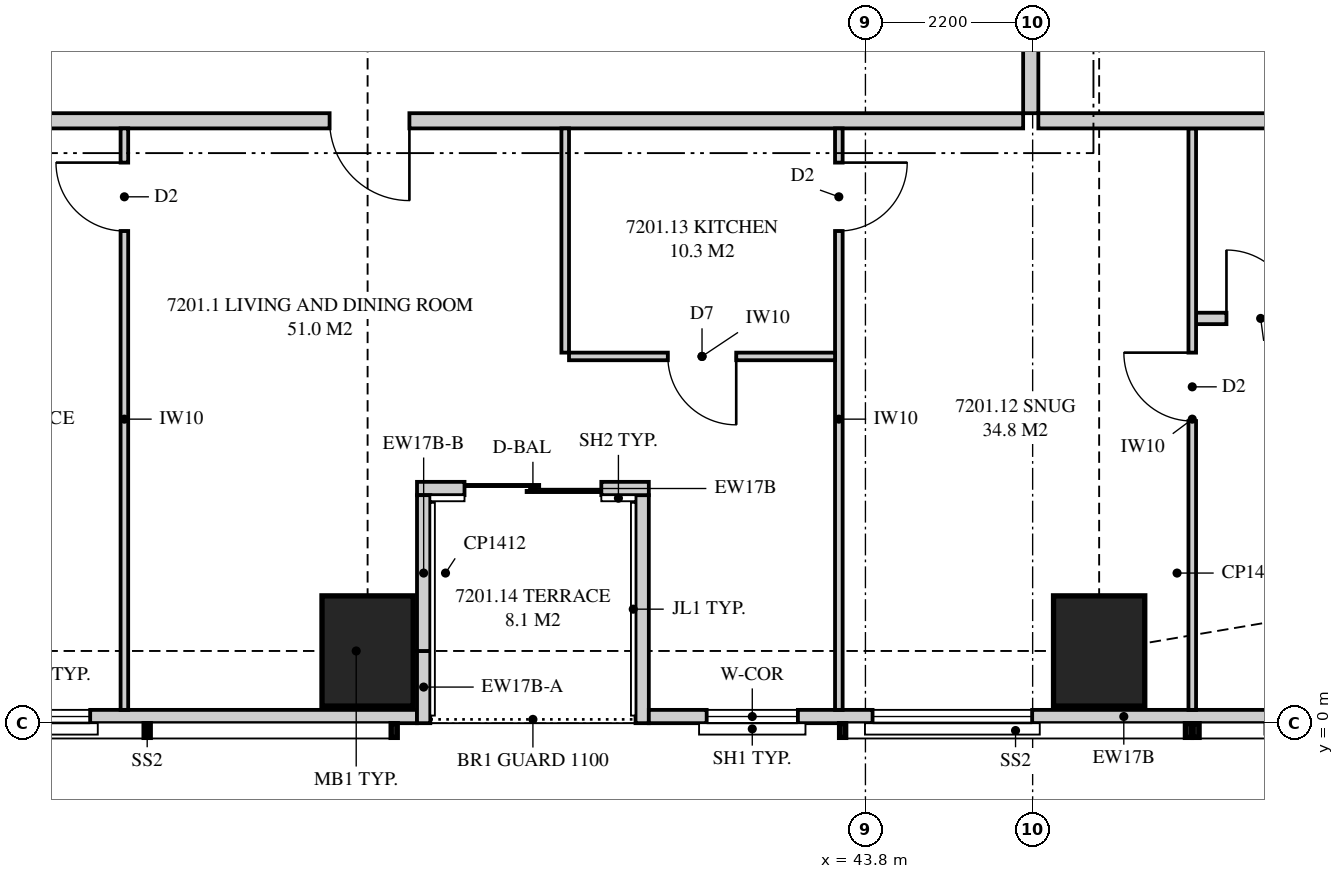
"""IFC4 building model, lengths in metres.
Left out: names, types, materials, properties, quantities, classifications, styles, units other than length and angle.
Written with IfcOpenShell. Run it as: python <this file> out.ifc"""

import sys

from ifc_helpers import new_model, si_unit, direction, frame, frame_2d, origin, origin_2d, place, context, subcontext, project, spatial, polyline, rectangle, outline, extrude, element, fill, save


model = new_model("IFC4")
c1 = context("Model", 3, precision=1e-05, world=origin(), true_north=direction((0.0, 1.0)))
c2 = subcontext(c1, "Body", "Model", "MODEL_VIEW")
j1 = project(units=[si_unit("LENGTHUNIT", "METRE"), si_unit("PLANEANGLEUNIT", "RADIAN")], contexts=[c1])
p1 = place(None, origin())
s1 = spatial("IfcSite", under=j1, at=p1, CompositionType="ELEMENT")
p2 = place(p1, origin())
s2 = spatial("IfcBuilding", under=s1, at=p2, CompositionType="ELEMENT")
p3 = place(p2, frame((0.0, 0.0, 263.85)))
s3 = spatial("IfcBuildingStorey", under=s2, at=p3, CompositionType="ELEMENT", Elevation=263.85)
for number, where, z_axis, x_axis in (
    (1, (37.25, 0.95, 0.0), (0.0, 0.0, 1.0), (0.0, 1.0, 0.0)),
    (2, (46.875, 0.95, 0.0), (0.0, 0.0, 1.0), (0.0, 1.0, 0.0)),
):
    element("IfcColumn", number, at=place(p3, frame(where, z_axis=z_axis, x_axis=x_axis)), inside=s3, PredefinedType="COLUMN", context=c2, shape_type="SweptSolid", body=[
        extrude(rectangle(XDim=1.45, YDim=1.2, at=origin_2d()), origin(), (0.0, 0.0, 1.0), 3.9),
    ])
p4 = place(p3, frame((19.851, 0.087, 0.0), z_axis=(0.0, 0.0, 1.0), x_axis=(1.0, 0.0, 0.0)))
e3 = element("IfcWall", 3, at=p4, inside=s3, PredefinedType="SOLIDWALL", context=c2, shape_type="SweptSolid", body=[
    extrude(outline(polyline([(0.0, 0.0), (18.049, 0.0), (18.049, 2.7), (7.774, 2.7), (7.774, 3.62), (7.642, 3.62), (7.642, 2.7), (7.559, 2.7), (7.559, 3.62), (0.0, 3.62), (0.0, 0.0)])), frame((0.0, 0.087, 0.0), z_axis=(0.0, -1.0, 0.0), x_axis=(1.0, 0.0, 0.0)), (0.0, 0.0, 1.0), 0.175),
])
p5 = place(p4, frame((3.399, 0.0, 0.4)))
e4 = element("IfcOpeningElement", 4, at=p5, cuts=e3, PredefinedType="OPENING", context=c2, shape_type="SweptSolid", body=[
    extrude(rectangle(XDim=2.1, YDim=2.25, at=frame_2d((1.05, 1.125))), frame((0.0, 0.097, 0.0), z_axis=(0.0, -1.0, 0.0), x_axis=(1.0, 0.0, 0.0)), (0.0, 0.0, 1.0), 0.195),
])
p6 = place(p4, frame((8.655, 0.0, 0.4)))
e5 = element("IfcOpeningElement", 5, at=p6, cuts=e3, PredefinedType="OPENING", context=c2, shape_type="SweptSolid", body=[
    extrude(rectangle(XDim=2.1, YDim=2.25, at=frame_2d((1.05, 1.125))), frame((0.0, 0.097, 0.0), z_axis=(0.0, -1.0, 0.0), x_axis=(1.0, 0.0, 0.0)), (0.0, 0.0, 1.0), 0.195),
])
p7 = place(p4, frame((11.649, 0.0, 0.4)))
e6 = element("IfcOpeningElement", 6, at=p7, cuts=e3, PredefinedType="OPENING", context=c2, shape_type="SweptSolid", body=[
    extrude(rectangle(XDim=2.1, YDim=2.25, at=frame_2d((1.05, 1.125))), frame((0.0, 0.097, 0.0), z_axis=(0.0, -1.0, 0.0), x_axis=(1.0, 0.0, 0.0)), (0.0, 0.0, 1.0), 0.195),
])
p8 = place(p3, frame((40.95, 0.087, 0.0), z_axis=(0.0, 0.0, 1.0), x_axis=(1.0, 0.0, 0.0)))
e7 = element("IfcWall", 7, at=p8, inside=s3, PredefinedType="SOLIDWALL", context=c2, shape_type="SweptSolid", body=[
    extrude(outline(polyline([(0.0, 0.0), (12.499, 0.0), (12.499, 3.62), (6.14, 3.62), (6.14, 2.7), (6.056, 2.7), (6.056, 3.62), (5.925, 3.62), (5.925, 2.7), (0.0, 2.7), (0.0, 0.0)])), frame((0.0, 0.087, 0.0), z_axis=(0.0, -1.0, 0.0), x_axis=(1.0, 0.0, 0.0)), (0.0, 0.0, 1.0), 0.175),
])
p9 = place(p8, frame((0.761, 0.0, 0.4)))
e8 = element("IfcOpeningElement", 8, at=p9, cuts=e7, PredefinedType="OPENING", context=c2, shape_type="SweptSolid", body=[
    extrude(rectangle(XDim=1.2, YDim=2.0, at=frame_2d((0.6, 1.0))), frame((0.0, 0.097, 0.0), z_axis=(0.0, -1.0, 0.0), x_axis=(1.0, 0.0, 0.0)), (0.0, 0.0, 1.0), 0.195),
])
p10 = place(p8, frame((2.944, 0.0, 0.4)))
e9 = element("IfcOpeningElement", 9, at=p10, cuts=e7, PredefinedType="OPENING", context=c2, shape_type="SweptSolid", body=[
    extrude(rectangle(XDim=2.1, YDim=2.25, at=frame_2d((1.05, 1.125))), frame((0.0, 0.097, 0.0), z_axis=(0.0, -1.0, 0.0), x_axis=(1.0, 0.0, 0.0)), (0.0, 0.0, 1.0), 0.195),
])
p11 = place(p8, frame((8.2, 0.0, 0.4)))
e10 = element("IfcOpeningElement", 10, at=p11, cuts=e7, PredefinedType="OPENING", context=c2, shape_type="SweptSolid", body=[
    extrude(rectangle(XDim=2.1, YDim=2.25, at=frame_2d((1.05, 1.125))), frame((0.0, 0.097, 0.0), z_axis=(0.0, -1.0, 0.0), x_axis=(1.0, 0.0, 0.0)), (0.0, 0.0, 1.0), 0.195),
])
p12 = place(p3, frame((37.9, 3.087, 0.0), z_axis=(0.0, 0.0, 1.0), x_axis=(1.0, 0.0, 0.0)))
e11 = element("IfcWall", 11, at=p12, inside=s3, PredefinedType="SOLIDWALL", context=c2, shape_type="SweptSolid", body=[
    extrude(outline(polyline([(0.0, 0.0), (3.05, 0.0), (3.05, 3.62), (0.55, 3.62), (0.55, 3.02), (0.0, 3.02), (0.0, 0.0)])), frame((0.0, 0.087, 0.0), z_axis=(0.0, -1.0, 0.0), x_axis=(1.0, 0.0, 0.0)), (0.0, 0.0, 1.0), 0.175),
])
p13 = place(p12, frame((0.625, 0.0, 0.0)))
e12 = element("IfcOpeningElement", 12, at=p13, cuts=e11, PredefinedType="OPENING", context=c2, shape_type="SweptSolid", body=[
    extrude(rectangle(XDim=1.8, YDim=2.4, at=frame_2d((0.9, 1.2))), frame((0.0, 0.097, 0.0), z_axis=(0.0, -1.0, 0.0), x_axis=(1.0, 0.0, 0.0)), (0.0, 0.0, 1.0), 0.195),
])
p14 = place(p3, frame((37.988, 0.0, 0.0), z_axis=(0.0, 0.0, 1.0), x_axis=(0.0, 1.0, 0.0)))
e13 = element("IfcWall", 13, at=p14, inside=s3, PredefinedType="SOLIDWALL", context=c2, shape_type="SweptSolid", body=[
    extrude(outline(polyline([(0.0, 0.0), (0.95, 0.0), (0.95, 2.7), (0.15, 2.7), (0.15, 3.62), (0.0, 3.62), (0.0, 0.0)])), frame((0.0, 0.087, 0.0), z_axis=(0.0, -1.0, 0.0), x_axis=(1.0, 0.0, 0.0)), (0.0, 0.0, 1.0), 0.175),
])
p15 = place(p3, frame((37.988, 0.95, 0.0), z_axis=(0.0, 0.0, 1.0), x_axis=(0.0, 1.0, 0.0)))
e14 = element("IfcWall", 14, at=p15, inside=s3, PredefinedType="SOLIDWALL", context=c2, shape_type="SweptSolid", body=[
    extrude(outline(polyline([(0.0, 0.0), (2.05, 0.0), (2.05, 3.02), (0.8, 3.02), (0.8, 2.7), (0.0, 2.7), (0.0, 0.0)])), frame((0.0, 0.087, 0.0), z_axis=(0.0, -1.0, 0.0), x_axis=(1.0, 0.0, 0.0)), (0.0, 0.0, 1.0), 0.175),
])
p16 = place(p3, frame((40.863, 0.0, 0.0), z_axis=(0.0, 0.0, 1.0), x_axis=(0.0, 1.0, 0.0)))
e15 = element("IfcWall", 15, at=p16, inside=s3, PredefinedType="SOLIDWALL", context=c2, shape_type="SweptSolid", body=[
    extrude(outline(polyline([(0.0, 0.0), (3.0, 0.0), (3.0, 3.62), (1.75, 3.62), (1.75, 2.7), (0.15, 2.7), (0.15, 3.62), (0.0, 3.62), (0.0, 0.0)])), frame((0.0, 0.087, 0.0), z_axis=(0.0, -1.0, 0.0), x_axis=(1.0, 0.0, 0.0)), (0.0, 0.0, 1.0), 0.175),
])
p17 = place(p3, frame((18.0, 7.925, 0.0), z_axis=(0.0, 0.0, 1.0), x_axis=(1.0, 0.0, 0.0)))
e16 = element("IfcWall", 16, at=p17, inside=s3, PredefinedType="PARTITIONING", context=c2, shape_type="SweptSolid", body=[
    extrude(outline(polyline([(0.0, 0.0), (27.875, 0.0), (27.875, 3.62), (27.875, 3.02), (27.565, 3.02), (27.565, 3.62), (20.56, 3.62), (20.56, 3.02), (17.94, 3.02), (17.94, 3.62), (10.935, 3.62), (10.935, 3.02), (8.315, 3.02), (8.315, 3.62), (3.517, 3.62), (3.517, 3.02), (1.839, 3.02), (1.839, 2.7), (0.0, 2.7), (0.0, 3.62), (0.0, 0.0)])), frame((0.0, 0.1, 0.0), z_axis=(0.0, -1.0, 0.0), x_axis=(1.0, 0.0, 0.0)), (0.0, 0.0, 1.0), 0.2),
])
p18 = place(p17, frame((18.75, 0.0, 0.0)))
e17 = element("IfcOpeningElement", 17, at=p18, cuts=e16, PredefinedType="OPENING", context=c2, shape_type="SweptSolid", body=[
    extrude(rectangle(XDim=1.05, YDim=2.2, at=frame_2d((0.525, 1.1))), frame((0.0, 0.11, 0.0), z_axis=(0.0, -1.0, 0.0), x_axis=(1.0, 0.0, 0.0)), (0.0, 0.0, 1.0), 0.22),
])
p19 = place(p3, frame((48.1, 0.175, 0.0), z_axis=(0.0, 0.0, 1.0), x_axis=(0.0, 1.0, 0.0)))
e18 = element("IfcWall", 18, at=p19, inside=s3, PredefinedType="PARTITIONING", context=c2, shape_type="SweptSolid", body=[
    extrude(outline(polyline([(0.0, 0.0), (7.65, 0.0), (7.65, 3.62), (7.65, 3.02), (1.855, 3.02), (1.855, 2.7), (0.11, 2.7), (0.11, 3.62), (0.0, 3.62), (0.0, 0.0)])), frame((0.0, 0.05, 0.0), z_axis=(0.0, -1.0, 0.0), x_axis=(1.0, 0.0, 0.0)), (0.0, 0.0, 1.0), 0.1),
])
p20 = place(p19, frame((3.8, 0.0, 0.0)))
e19 = element("IfcOpeningElement", 19, at=p20, cuts=e18, PredefinedType="OPENING", context=c2, shape_type="SweptSolid", body=[
    extrude(rectangle(XDim=0.9, YDim=2.1, at=frame_2d((0.45, 1.05))), frame((0.0, 0.06, 0.0), z_axis=(0.0, -1.0, 0.0), x_axis=(1.0, 0.0, 0.0)), (0.0, 0.0, 1.0), 0.12),
])
p21 = place(p3, frame((48.15, 5.325, 0.0), z_axis=(0.0, 0.0, 1.0), x_axis=(1.0, 0.0, 0.0)))
e20 = element("IfcWall", 20, at=p21, inside=s3, PredefinedType="PLUMBINGWALL", context=c2, shape_type="SweptSolid", body=[
    extrude(outline(polyline([(0.0, 0.0), (4.1, 0.0), (4.1, 3.62), (0.01, 3.62), (0.01, 3.02), (0.0, 3.02), (0.0, 3.62), (0.0, 0.0)])), frame((0.0, 0.075, 0.0), z_axis=(0.0, -1.0, 0.0), x_axis=(1.0, 0.0, 0.0)), (0.0, 0.0, 1.0), 0.15),
])
p22 = place(p21, frame((0.4, 0.0, 0.0)))
e21 = element("IfcOpeningElement", 21, at=p22, cuts=e20, PredefinedType="OPENING", context=c2, shape_type="SweptSolid", body=[
    extrude(rectangle(XDim=0.9, YDim=2.1, at=frame_2d((0.45, 1.05))), frame((0.0, 0.085, 0.0), z_axis=(0.0, -1.0, 0.0), x_axis=(1.0, 0.0, 0.0)), (0.0, 0.0, 1.0), 0.17),
])
p23 = place(p3, frame((34.05, 0.175, 0.0), z_axis=(0.0, 0.0, 1.0), x_axis=(0.0, 1.0, 0.0)))
e22 = element("IfcWall", 22, at=p23, inside=s3, PredefinedType="PARTITIONING", context=c2, shape_type="SweptSolid", body=[
    extrude(outline(polyline([(0.0, 0.0), (7.65, 0.0), (7.65, 3.62), (1.635, 3.62), (1.635, 2.7), (0.0, 2.7), (0.0, 3.62), (0.0, 0.0)])), frame((0.0, 0.05, 0.0), z_axis=(0.0, -1.0, 0.0), x_axis=(1.0, 0.0, 0.0)), (0.0, 0.0, 1.0), 0.1),
])
p24 = place(p23, frame((6.3, 0.0, 0.0)))
e23 = element("IfcOpeningElement", 23, at=p24, cuts=e22, PredefinedType="OPENING", context=c2, shape_type="SweptSolid", body=[
    extrude(rectangle(XDim=0.9, YDim=2.1, at=frame_2d((0.45, 1.05))), frame((0.0, 0.06, 0.0), z_axis=(0.0, -1.0, 0.0), x_axis=(1.0, 0.0, 0.0)), (0.0, 0.0, 1.0), 0.12),
])
p25 = place(p3, frame((43.45, 0.175, 0.0), z_axis=(0.0, 0.0, 1.0), x_axis=(0.0, 1.0, 0.0)))
e24 = element("IfcWall", 24, at=p25, inside=s3, PredefinedType="PARTITIONING", context=c2, shape_type="SweptSolid", body=[
    extrude(outline(polyline([(0.0, 0.0), (7.65, 0.0), (7.65, 3.62), (1.635, 3.62), (1.635, 2.7), (0.0, 2.7), (0.0, 3.62), (0.0, 0.0)])), frame((0.0, 0.05, 0.0), z_axis=(0.0, -1.0, 0.0), x_axis=(1.0, 0.0, 0.0)), (0.0, 0.0, 1.0), 0.1),
])
p26 = place(p25, frame((6.3, 0.0, 0.0)))
e25 = element("IfcOpeningElement", 25, at=p26, cuts=e24, PredefinedType="OPENING", context=c2, shape_type="SweptSolid", body=[
    extrude(rectangle(XDim=0.9, YDim=2.1, at=frame_2d((0.45, 1.05))), frame((0.0, 0.06, 0.0), z_axis=(0.0, -1.0, 0.0), x_axis=(1.0, 0.0, 0.0)), (0.0, 0.0, 1.0), 0.12),
])
p27 = place(p3, frame((39.9, 4.825, 0.0), z_axis=(0.0, 0.0, 1.0), x_axis=(1.0, 0.0, 0.0)))
e26 = element("IfcWall", 26, at=p27, inside=s3, PredefinedType="PARTITIONING", context=c2, shape_type="SweptSolid", body=[
    extrude(rectangle(XDim=3.5, YDim=0.1, at=frame_2d((1.75, 0.0))), origin(), (0.0, 0.0, 1.0), 3.62),
])
p28 = place(p27, frame((1.3, 0.0, 0.0)))
e27 = element("IfcOpeningElement", 27, at=p28, cuts=e26, PredefinedType="OPENING", context=c2, shape_type="SweptSolid", body=[
    extrude(rectangle(XDim=0.9, YDim=2.1, at=frame_2d((0.45, 1.05))), frame((0.0, 0.06, 0.0), z_axis=(0.0, -1.0, 0.0), x_axis=(1.0, 0.0, 0.0)), (0.0, 0.0, 1.0), 0.12),
])
p29 = place(p3, frame((39.85, 4.875, 0.0), z_axis=(0.0, 0.0, 1.0), x_axis=(0.0, 1.0, 0.0)))
e28 = element("IfcWall", 28, at=p29, inside=s3, PredefinedType="PARTITIONING", context=c2, shape_type="SweptSolid", body=[
    extrude(rectangle(XDim=2.95, YDim=0.1, at=frame_2d((1.475, 0.0))), origin(), (0.0, 0.0, 1.0), 3.62),
])
p30 = place(p3, frame((46.075, 7.925, 0.0), z_axis=(0.0, 0.0, 1.0), x_axis=(1.0, 0.0, 0.0)))
e29 = element("IfcWall", 29, at=p30, inside=s3, PredefinedType="PARTITIONING", context=c2, shape_type="SweptSolid", body=[
    extrude(outline(polyline([(0.0, 0.0), (10.425, 0.0), (10.425, 3.62), (9.8, 3.62), (9.8, 2.7), (7.968, 2.7), (7.968, 3.62), (2.11, 3.62), (2.11, 3.02), (0.0, 3.02), (0.0, 3.62), (0.0, 0.0)])), frame((0.0, 0.1, 0.0), z_axis=(0.0, -1.0, 0.0), x_axis=(1.0, 0.0, 0.0)), (0.0, 0.0, 1.0), 0.2),
])
p31 = place(p3, frame((45.975, 8.025, 0.0), z_axis=(0.0, 0.0, 1.0), x_axis=(0.0, 1.0, 0.0)))
e30 = element("IfcWall", 30, at=p31, inside=s3, PredefinedType="PARTITIONING", context=c2, shape_type="SweptSolid", body=[
    extrude(rectangle(XDim=4.975, YDim=0.2, at=frame_2d((2.488, 0.0))), origin(), (0.0, 0.0, 1.0), 3.02),
])
p32 = place(p7, origin())
e31 = element("IfcWindow", 31, at=p32, inside=s3, PartitioningType="SINGLE_PANEL", PredefinedType="WINDOW", context=c2, shape_type="SweptSolid", body=[
    extrude(rectangle(XDim=2.1, YDim=2.25, at=frame_2d((1.05, 1.125))), frame((0.0, 0.03, 0.0), z_axis=(0.0, -1.0, 0.0), x_axis=(1.0, 0.0, 0.0)), (0.0, 0.0, 1.0), 0.06),
])
fill(e6, e31)
p33 = place(p13, origin())
e32 = element("IfcDoor", 32, at=p33, inside=s3, OperationType="SLIDING_TO_LEFT", PredefinedType="DOOR", context=c2, shape_type="SweptSolid", body=[
    extrude(rectangle(XDim=1.8, YDim=2.4, at=frame_2d((0.9, 1.2))), frame((0.0, 0.025, 0.0), z_axis=(0.0, -1.0, 0.0), x_axis=(1.0, 0.0, 0.0)), (0.0, 0.0, 1.0), 0.05),
])
fill(e12, e32)
p34 = place(p9, origin())
e33 = element("IfcWindow", 33, at=p34, inside=s3, PartitioningType="SINGLE_PANEL", PredefinedType="WINDOW", context=c2, shape_type="SweptSolid", body=[
    extrude(rectangle(XDim=1.2, YDim=2.0, at=frame_2d((0.6, 1.0))), frame((0.0, 0.03, 0.0), z_axis=(0.0, -1.0, 0.0), x_axis=(1.0, 0.0, 0.0)), (0.0, 0.0, 1.0), 0.06),
])
fill(e8, e33)
p35 = place(p10, origin())
e34 = element("IfcWindow", 34, at=p35, inside=s3, PartitioningType="SINGLE_PANEL", PredefinedType="WINDOW", context=c2, shape_type="SweptSolid", body=[
    extrude(rectangle(XDim=2.1, YDim=2.25, at=frame_2d((1.05, 1.125))), frame((0.0, 0.03, 0.0), z_axis=(0.0, -1.0, 0.0), x_axis=(1.0, 0.0, 0.0)), (0.0, 0.0, 1.0), 0.06),
])
fill(e9, e34)
p36 = place(p18, frame((1.05, 0.0, 0.0), z_axis=(0.0, 0.0, 1.0), x_axis=(-1.0, 0.0, 0.0)))
e35 = element("IfcDoor", 35, at=p36, inside=s3, OperationType="SINGLE_SWING_LEFT", PredefinedType="DOOR", context=c2, shape_type="SweptSolid", body=[
    extrude(rectangle(XDim=1.05, YDim=2.2, at=frame_2d((0.525, 1.1))), frame((0.0, 0.025, 0.0), z_axis=(0.0, -1.0, 0.0), x_axis=(1.0, 0.0, 0.0)), (0.0, 0.0, 1.0), 0.05),
])
fill(e17, e35)
p37 = place(p20, origin())
e36 = element("IfcDoor", 36, at=p37, inside=s3, OperationType="SINGLE_SWING_RIGHT", PredefinedType="DOOR", context=c2, shape_type="SweptSolid", body=[
    extrude(rectangle(XDim=0.9, YDim=2.1, at=frame_2d((0.45, 1.05))), frame((0.0, 0.025, 0.0), z_axis=(0.0, -1.0, 0.0), x_axis=(1.0, 0.0, 0.0)), (0.0, 0.0, 1.0), 0.05),
])
fill(e19, e36)
p38 = place(p22, origin())
e37 = element("IfcDoor", 37, at=p38, inside=s3, OperationType="SINGLE_SWING_LEFT", PredefinedType="DOOR", context=c2, shape_type="SweptSolid", body=[
    extrude(rectangle(XDim=0.9, YDim=2.1, at=frame_2d((0.45, 1.05))), frame((0.0, 0.025, 0.0), z_axis=(0.0, -1.0, 0.0), x_axis=(1.0, 0.0, 0.0)), (0.0, 0.0, 1.0), 0.05),
])
fill(e21, e37)
p39 = place(p24, origin())
e38 = element("IfcDoor", 38, at=p39, inside=s3, OperationType="SINGLE_SWING_RIGHT", PredefinedType="DOOR", context=c2, shape_type="SweptSolid", body=[
    extrude(rectangle(XDim=0.9, YDim=2.1, at=frame_2d((0.45, 1.05))), frame((0.0, 0.025, 0.0), z_axis=(0.0, -1.0, 0.0), x_axis=(1.0, 0.0, 0.0)), (0.0, 0.0, 1.0), 0.05),
])
fill(e23, e38)
p40 = place(p26, frame((0.9, 0.0, 0.0), z_axis=(0.0, 0.0, 1.0), x_axis=(-1.0, 0.0, 0.0)))
e39 = element("IfcDoor", 39, at=p40, inside=s3, OperationType="SINGLE_SWING_LEFT", PredefinedType="DOOR", context=c2, shape_type="SweptSolid", body=[
    extrude(rectangle(XDim=0.9, YDim=2.1, at=frame_2d((0.45, 1.05))), frame((0.0, 0.025, 0.0), z_axis=(0.0, -1.0, 0.0), x_axis=(1.0, 0.0, 0.0)), (0.0, 0.0, 1.0), 0.05),
])
fill(e25, e39)
p41 = place(p28, frame((0.9, 0.0, 0.0), z_axis=(0.0, 0.0, 1.0), x_axis=(-1.0, 0.0, 0.0)))
e40 = element("IfcDoor", 40, at=p41, inside=s3, OperationType="SINGLE_SWING_LEFT", PredefinedType="DOOR", context=c2, shape_type="SweptSolid", body=[
    extrude(rectangle(XDim=0.9, YDim=2.1, at=frame_2d((0.45, 1.05))), frame((0.0, 0.025, 0.0), z_axis=(0.0, -1.0, 0.0), x_axis=(1.0, 0.0, 0.0)), (0.0, 0.0, 1.0), 0.05),
])
fill(e27, e40)
save(model, sys.argv[1])
